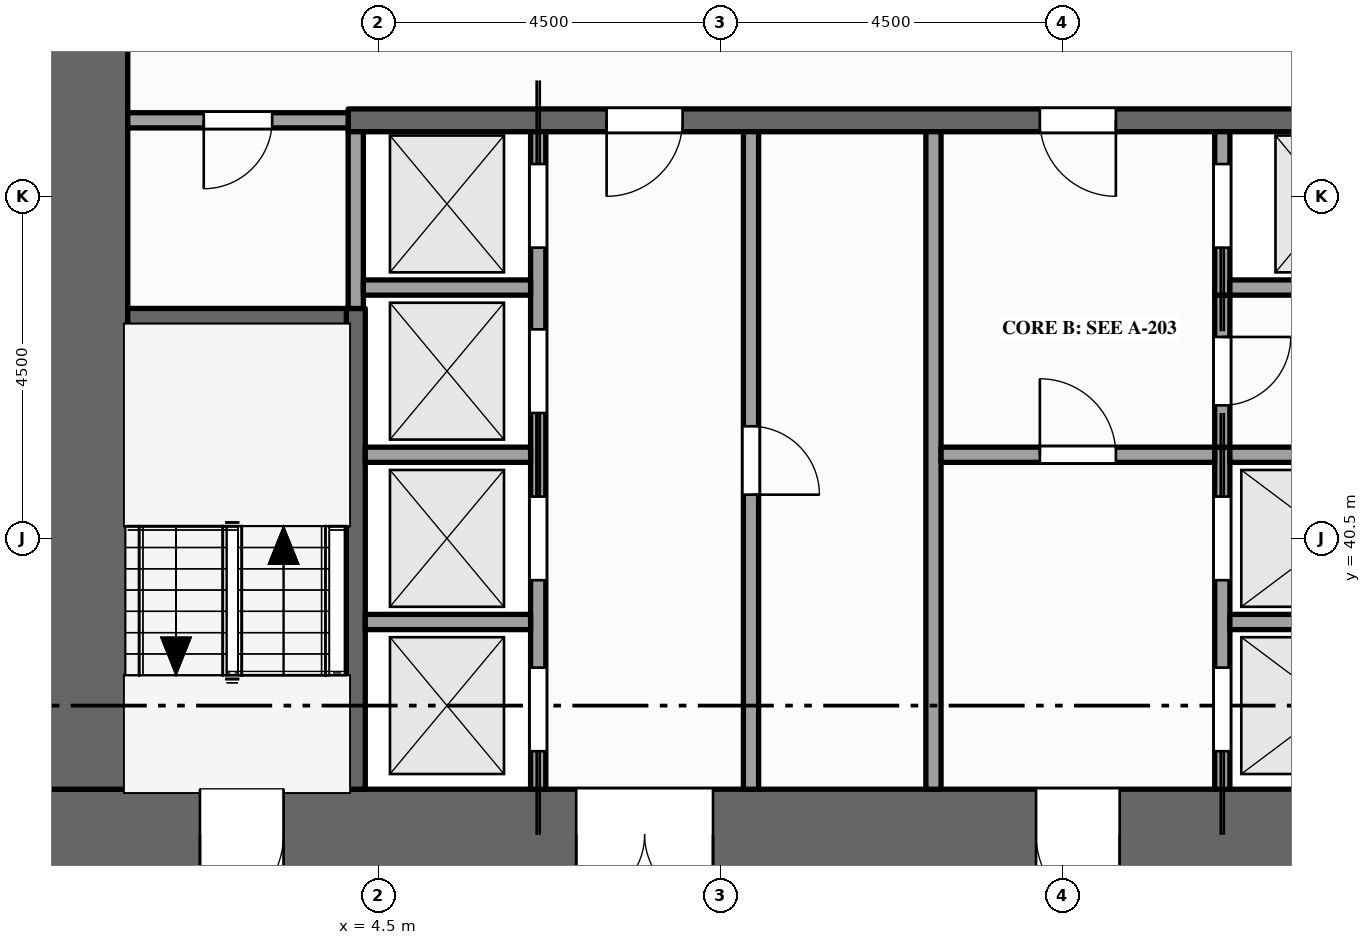
"""IFC4 building model, lengths in metres.
Left out: names, types, materials, properties, quantities, classifications, styles, units other than length and angle.
Written with IfcOpenShell. Run it as: python <this file> out.ifc"""

import sys

from ifc_helpers import new_model, si_unit, direction, frame, frame_2d, origin, place, context, subcontext, project, spatial, rectangle, extrude, element, fill, save


model = new_model("IFC4")
c1 = context("Model", 3, precision=1e-05, world=origin(), true_north=direction((0.0, 1.0)))
c2 = subcontext(c1, "Body", "Model", "MODEL_VIEW")
j1 = project(units=[si_unit("LENGTHUNIT", "METRE"), si_unit("PLANEANGLEUNIT", "RADIAN")], contexts=[c1])
p1 = place(None, origin())
s1 = spatial("IfcSite", under=j1, at=p1, CompositionType="ELEMENT")
p2 = place(p1, origin())
s2 = spatial("IfcBuilding", under=s1, at=p2, CompositionType="ELEMENT")
p3 = place(p2, frame((0.0, 0.0, 14.0)))
s3 = spatial("IfcBuildingStorey", under=s2, at=p3, CompositionType="ELEMENT", Elevation=14.0)
p4 = place(p3, frame((0.0, 36.6, -0.15), z_axis=(0.0, 0.0, 1.0), x_axis=(1.0, 0.0, 0.0)))
e1 = element("IfcWall", 1, at=p4, inside=s3, PredefinedType="SHEAR", context=c2, shape_type="SweptSolid", body=[
    extrude(rectangle(XDim=22.5, YDim=1.2, at=frame_2d((11.25, 0.0))), origin(), (0.0, 0.0, 1.0), 5.0),
])
p5 = place(p4, frame((7.1, 0.0, 0.15)))
e2 = element("IfcOpeningElement", 2, at=p5, cuts=e1, PredefinedType="OPENING", context=c2, shape_type="SweptSolid", body=[
    extrude(rectangle(XDim=1.8, YDim=2.1, at=frame_2d((0.9, 1.05))), frame((0.0, 0.61, 0.0), z_axis=(0.0, -1.0, 0.0), x_axis=(1.0, 0.0, 0.0)), (0.0, 0.0, 1.0), 1.22),
])
p6 = place(p4, frame((13.15, 0.0, 0.15)))
e3 = element("IfcOpeningElement", 3, at=p6, cuts=e1, PredefinedType="OPENING", context=c2, shape_type="SweptSolid", body=[
    extrude(rectangle(XDim=1.1, YDim=2.1, at=frame_2d((0.55, 1.05))), frame((0.0, 0.61, 0.0), z_axis=(0.0, -1.0, 0.0), x_axis=(1.0, 0.0, 0.0)), (0.0, 0.0, 1.0), 1.22),
])
p7 = place(p4, frame((2.15, 0.0, 0.15)))
e4 = element("IfcOpeningElement", 4, at=p7, cuts=e1, PredefinedType="OPENING", context=c2, shape_type="SweptSolid", body=[
    extrude(rectangle(XDim=1.1, YDim=2.1, at=frame_2d((0.55, 1.05))), frame((0.0, 0.61, 0.0), z_axis=(0.0, -1.0, 0.0), x_axis=(1.0, 0.0, 0.0)), (0.0, 0.0, 1.0), 1.22),
])
p8 = place(p4, frame((19.35, 0.0, 0.15)))
e5 = element("IfcOpeningElement", 5, at=p8, cuts=e1, PredefinedType="OPENING", context=c2, shape_type="SweptSolid", body=[
    extrude(rectangle(XDim=1.1, YDim=2.1, at=frame_2d((0.55, 1.05))), frame((0.0, 0.61, 0.0), z_axis=(0.0, -1.0, 0.0), x_axis=(1.0, 0.0, 0.0)), (0.0, 0.0, 1.0), 1.22),
])
p9 = place(p3, frame((0.6, 37.2, -0.15), z_axis=(0.0, 0.0, 1.0), x_axis=(0.0, 1.0, 0.0)))
e6 = element("IfcWall", 6, at=p9, inside=s3, PredefinedType="SHEAR", context=c2, shape_type="SweptSolid", body=[
    extrude(rectangle(XDim=11.1, YDim=1.2, at=frame_2d((5.55, 0.0))), origin(), (0.0, 0.0, 1.0), 5.0),
])
p10 = place(p3, frame((4.2, 37.2, 0.0), z_axis=(0.0, 0.0, 1.0), x_axis=(0.0, 1.0, 0.0)))
e7 = element("IfcWall", 7, at=p10, inside=s3, PredefinedType="SHEAR", context=c2, shape_type="SweptSolid", body=[
    extrude(rectangle(XDim=6.325, YDim=0.25, at=frame_2d((3.163, 0.0))), origin(), (0.0, 0.0, 1.0), 4.75),
])
p11 = place(p3, frame((4.2, 43.525, 0.0), z_axis=(0.0, 0.0, 1.0), x_axis=(0.0, 1.0, 0.0)))
e8 = element("IfcWall", 8, at=p11, inside=s3, PredefinedType="SOLIDWALL", context=c2, shape_type="SweptSolid", body=[
    extrude(rectangle(XDim=2.325, YDim=0.2, at=frame_2d((1.163, 0.0))), origin(), (0.0, 0.0, 1.0), 4.75),
])
p12 = place(p3, frame((6.6, 37.2, 0.0), z_axis=(0.0, 0.0, 1.0), x_axis=(0.0, 1.0, 0.0)))
e9 = element("IfcWall", 9, at=p12, inside=s3, PredefinedType="SOLIDWALL", context=c2, shape_type="SweptSolid", body=[
    extrude(rectangle(XDim=8.65, YDim=0.2, at=frame_2d((4.325, 0.0))), origin(), (0.0, 0.0, 1.0), 4.75),
])
p13 = place(p12, frame((0.5, 0.0, 0.012)))
e10 = element("IfcOpeningElement", 10, at=p13, cuts=e9, PredefinedType="OPENING", context=c2, shape_type="SweptSolid", body=[
    extrude(rectangle(XDim=1.1, YDim=2.1, at=frame_2d((0.55, 1.05))), frame((0.0, 0.11, 0.0), z_axis=(0.0, -1.0, 0.0), x_axis=(1.0, 0.0, 0.0)), (0.0, 0.0, 1.0), 0.22),
])
p14 = place(p12, frame((2.75, 0.0, 0.012)))
e11 = element("IfcOpeningElement", 11, at=p14, cuts=e9, PredefinedType="OPENING", context=c2, shape_type="SweptSolid", body=[
    extrude(rectangle(XDim=1.1, YDim=2.1, at=frame_2d((0.55, 1.05))), frame((0.0, 0.11, 0.0), z_axis=(0.0, -1.0, 0.0), x_axis=(1.0, 0.0, 0.0)), (0.0, 0.0, 1.0), 0.22),
])
p15 = place(p12, frame((4.95, 0.0, 0.012)))
e12 = element("IfcOpeningElement", 12, at=p15, cuts=e9, PredefinedType="OPENING", context=c2, shape_type="SweptSolid", body=[
    extrude(rectangle(XDim=1.1, YDim=2.1, at=frame_2d((0.55, 1.05))), frame((0.0, 0.11, 0.0), z_axis=(0.0, -1.0, 0.0), x_axis=(1.0, 0.0, 0.0)), (0.0, 0.0, 1.0), 0.22),
])
p16 = place(p12, frame((7.125, 0.0, 0.012)))
e13 = element("IfcOpeningElement", 13, at=p16, cuts=e9, PredefinedType="OPENING", context=c2, shape_type="SweptSolid", body=[
    extrude(rectangle(XDim=1.1, YDim=2.1, at=frame_2d((0.55, 1.05))), frame((0.0, 0.11, 0.0), z_axis=(0.0, -1.0, 0.0), x_axis=(1.0, 0.0, 0.0)), (0.0, 0.0, 1.0), 0.22),
])
p17 = place(p3, frame((9.4, 37.2, 0.0), z_axis=(0.0, 0.0, 1.0), x_axis=(0.0, 1.0, 0.0)))
e14 = element("IfcWall", 14, at=p17, inside=s3, PredefinedType="PARTITIONING", context=c2, shape_type="SweptSolid", body=[
    extrude(rectangle(XDim=8.65, YDim=0.2, at=frame_2d((4.325, 0.0))), origin(), (0.0, 0.0, 1.0), 4.75),
])
p18 = place(p17, frame((3.875, 0.0, 0.0)))
e15 = element("IfcOpeningElement", 15, at=p18, cuts=e14, PredefinedType="OPENING", context=c2, shape_type="SweptSolid", body=[
    extrude(rectangle(XDim=0.9, YDim=2.1, at=frame_2d((0.45, 1.05))), frame((0.0, 0.11, 0.0), z_axis=(0.0, -1.0, 0.0), x_axis=(1.0, 0.0, 0.0)), (0.0, 0.0, 1.0), 0.22),
])
p19 = place(p3, frame((11.8, 37.2, 0.0), z_axis=(0.0, 0.0, 1.0), x_axis=(0.0, 1.0, 0.0)))
e16 = element("IfcWall", 16, at=p19, inside=s3, PredefinedType="PARTITIONING", context=c2, shape_type="SweptSolid", body=[
    extrude(rectangle(XDim=8.65, YDim=0.2, at=frame_2d((4.325, 0.0))), origin(), (0.0, 0.0, 1.0), 4.75),
])
p20 = place(p3, frame((15.6, 37.2, 0.0), z_axis=(0.0, 0.0, 1.0), x_axis=(0.0, 1.0, 0.0)))
e17 = element("IfcWall", 17, at=p20, inside=s3, PredefinedType="SOLIDWALL", context=c2, shape_type="SweptSolid", body=[
    extrude(rectangle(XDim=4.5, YDim=0.2, at=frame_2d((2.25, 0.0))), origin(), (0.0, 0.0, 1.0), 4.75),
])
p21 = place(p20, frame((0.5, 0.0, 0.012)))
e18 = element("IfcOpeningElement", 18, at=p21, cuts=e17, PredefinedType="OPENING", context=c2, shape_type="SweptSolid", body=[
    extrude(rectangle(XDim=1.1, YDim=2.1, at=frame_2d((0.55, 1.05))), frame((0.0, 0.11, 0.0), z_axis=(0.0, -1.0, 0.0), x_axis=(1.0, 0.0, 0.0)), (0.0, 0.0, 1.0), 0.22),
])
p22 = place(p20, frame((2.75, 0.0, 0.012)))
e19 = element("IfcOpeningElement", 19, at=p22, cuts=e17, PredefinedType="OPENING", context=c2, shape_type="SweptSolid", body=[
    extrude(rectangle(XDim=1.1, YDim=2.1, at=frame_2d((0.55, 1.05))), frame((0.0, 0.11, 0.0), z_axis=(0.0, -1.0, 0.0), x_axis=(1.0, 0.0, 0.0)), (0.0, 0.0, 1.0), 0.22),
])
p23 = place(p3, frame((15.6, 41.7, 0.0), z_axis=(0.0, 0.0, 1.0), x_axis=(0.0, 1.0, 0.0)))
e20 = element("IfcWall", 20, at=p23, inside=s3, PredefinedType="PARTITIONING", context=c2, shape_type="SweptSolid", body=[
    extrude(rectangle(XDim=2.0, YDim=0.2, at=frame_2d((1.0, 0.0))), origin(), (0.0, 0.0, 1.0), 4.75),
])
p24 = place(p23, frame((0.55, 0.0, 0.0)))
e21 = element("IfcOpeningElement", 21, at=p24, cuts=e20, PredefinedType="OPENING", context=c2, shape_type="SweptSolid", body=[
    extrude(rectangle(XDim=0.9, YDim=2.1, at=frame_2d((0.45, 1.05))), frame((0.0, 0.11, 0.0), z_axis=(0.0, -1.0, 0.0), x_axis=(1.0, 0.0, 0.0)), (0.0, 0.0, 1.0), 0.22),
])
p25 = place(p3, frame((15.6, 43.7, 0.0), z_axis=(0.0, 0.0, 1.0), x_axis=(0.0, 1.0, 0.0)))
e22 = element("IfcWall", 22, at=p25, inside=s3, PredefinedType="SOLIDWALL", context=c2, shape_type="SweptSolid", body=[
    extrude(rectangle(XDim=2.15, YDim=0.2, at=frame_2d((1.075, 0.0))), origin(), (0.0, 0.0, 1.0), 4.75),
])
p26 = place(p25, frame((0.625, 0.0, 0.012)))
e23 = element("IfcOpeningElement", 23, at=p26, cuts=e22, PredefinedType="OPENING", context=c2, shape_type="SweptSolid", body=[
    extrude(rectangle(XDim=1.1, YDim=2.1, at=frame_2d((0.55, 1.05))), frame((0.0, 0.11, 0.0), z_axis=(0.0, -1.0, 0.0), x_axis=(1.0, 0.0, 0.0)), (0.0, 0.0, 1.0), 0.22),
])
p27 = place(p3, frame((4.325, 39.4, 0.0), z_axis=(0.0, 0.0, 1.0), x_axis=(1.0, 0.0, 0.0)))
e24 = element("IfcWall", 24, at=p27, inside=s3, PredefinedType="SOLIDWALL", context=c2, shape_type="SweptSolid", body=[
    extrude(rectangle(XDim=2.175, YDim=0.2, at=frame_2d((1.087, 0.0))), origin(), (0.0, 0.0, 1.0), 4.75),
])
p28 = place(p3, frame((15.7, 39.4, 0.0), z_axis=(0.0, 0.0, 1.0), x_axis=(1.0, 0.0, 0.0)))
e25 = element("IfcWall", 25, at=p28, inside=s3, PredefinedType="SOLIDWALL", context=c2, shape_type="SweptSolid", body=[
    extrude(rectangle(XDim=2.675, YDim=0.2, at=frame_2d((1.337, 0.0))), origin(), (0.0, 0.0, 1.0), 4.75),
])
p29 = place(p3, frame((4.325, 41.6, 0.0), z_axis=(0.0, 0.0, 1.0), x_axis=(1.0, 0.0, 0.0)))
e26 = element("IfcWall", 26, at=p29, inside=s3, PredefinedType="SOLIDWALL", context=c2, shape_type="SweptSolid", body=[
    extrude(rectangle(XDim=2.175, YDim=0.2, at=frame_2d((1.087, 0.0))), origin(), (0.0, 0.0, 1.0), 4.75),
])
p30 = place(p3, frame((11.9, 41.6, 0.0), z_axis=(0.0, 0.0, 1.0), x_axis=(1.0, 0.0, 0.0)))
e27 = element("IfcWall", 27, at=p30, inside=s3, PredefinedType="PARTITIONING", context=c2, shape_type="SweptSolid", body=[
    extrude(rectangle(XDim=3.6, YDim=0.2, at=frame_2d((1.8, 0.0))), origin(), (0.0, 0.0, 1.0), 4.75),
])
p31 = place(p30, frame((1.3, 0.0, 0.0)))
e28 = element("IfcOpeningElement", 28, at=p31, cuts=e27, PredefinedType="OPENING", context=c2, shape_type="SweptSolid", body=[
    extrude(rectangle(XDim=1.0, YDim=2.1, at=frame_2d((0.5, 1.05))), frame((0.0, 0.11, 0.0), z_axis=(0.0, -1.0, 0.0), x_axis=(1.0, 0.0, 0.0)), (0.0, 0.0, 1.0), 0.22),
])
p32 = place(p3, frame((15.7, 41.6, 0.0), z_axis=(0.0, 0.0, 1.0), x_axis=(1.0, 0.0, 0.0)))
e29 = element("IfcWall", 29, at=p32, inside=s3, PredefinedType="SOLIDWALL", context=c2, shape_type="SweptSolid", body=[
    extrude(rectangle(XDim=2.675, YDim=0.2, at=frame_2d((1.337, 0.0))), origin(), (0.0, 0.0, 1.0), 4.75),
])
p33 = place(p3, frame((1.2, 43.4, 0.0), z_axis=(0.0, 0.0, 1.0), x_axis=(1.0, 0.0, 0.0)))
e30 = element("IfcWall", 30, at=p33, inside=s3, PredefinedType="SHEAR", context=c2, shape_type="SweptSolid", body=[
    extrude(rectangle(XDim=2.875, YDim=0.25, at=frame_2d((1.438, 0.0))), origin(), (0.0, 0.0, 1.0), 4.75),
])
p34 = place(p3, frame((4.3, 43.8, 0.0), z_axis=(0.0, 0.0, 1.0), x_axis=(1.0, 0.0, 0.0)))
e31 = element("IfcWall", 31, at=p34, inside=s3, PredefinedType="SOLIDWALL", context=c2, shape_type="SweptSolid", body=[
    extrude(rectangle(XDim=2.2, YDim=0.2, at=frame_2d((1.1, 0.0))), origin(), (0.0, 0.0, 1.0), 4.75),
])
p35 = place(p3, frame((15.7, 43.8, 0.0), z_axis=(0.0, 0.0, 1.0), x_axis=(1.0, 0.0, 0.0)))
e32 = element("IfcWall", 32, at=p35, inside=s3, PredefinedType="SOLIDWALL", context=c2, shape_type="SweptSolid", body=[
    extrude(rectangle(XDim=2.7, YDim=0.2, at=frame_2d((1.35, 0.0))), origin(), (0.0, 0.0, 1.0), 4.75),
])
p36 = place(p3, frame((1.2, 46.0, 0.0), z_axis=(0.0, 0.0, 1.0), x_axis=(1.0, 0.0, 0.0)))
e33 = element("IfcWall", 33, at=p36, inside=s3, PredefinedType="PARTITIONING", context=c2, shape_type="SweptSolid", body=[
    extrude(rectangle(XDim=2.9, YDim=0.2, at=frame_2d((1.45, 0.0))), origin(), (0.0, 0.0, 1.0), 4.75),
])
p37 = place(p36, frame((1.0, 0.0, 0.0)))
e34 = element("IfcOpeningElement", 34, at=p37, cuts=e33, PredefinedType="OPENING", context=c2, shape_type="SweptSolid", body=[
    extrude(rectangle(XDim=0.9, YDim=2.1, at=frame_2d((0.45, 1.05))), frame((0.0, 0.11, 0.0), z_axis=(0.0, -1.0, 0.0), x_axis=(1.0, 0.0, 0.0)), (0.0, 0.0, 1.0), 0.22),
])
p38 = place(p3, frame((4.1, 46.0, 0.0), z_axis=(0.0, 0.0, 1.0), x_axis=(1.0, 0.0, 0.0)))
e35 = element("IfcWall", 35, at=p38, inside=s3, PredefinedType="SHEAR", context=c2, shape_type="SweptSolid", body=[
    extrude(rectangle(XDim=14.5, YDim=0.3, at=frame_2d((7.25, 0.0))), origin(), (0.0, 0.0, 1.0), 4.75),
])
p39 = place(p38, frame((3.4, 0.0, 0.0)))
e36 = element("IfcOpeningElement", 36, at=p39, cuts=e35, PredefinedType="OPENING", context=c2, shape_type="SweptSolid", body=[
    extrude(rectangle(XDim=1.0, YDim=2.1, at=frame_2d((0.5, 1.05))), frame((0.0, 0.16, 0.0), z_axis=(0.0, -1.0, 0.0), x_axis=(1.0, 0.0, 0.0)), (0.0, 0.0, 1.0), 0.32),
])
p40 = place(p38, frame((9.1, 0.0, 0.0)))
e37 = element("IfcOpeningElement", 37, at=p40, cuts=e35, PredefinedType="OPENING", context=c2, shape_type="SweptSolid", body=[
    extrude(rectangle(XDim=1.0, YDim=2.1, at=frame_2d((0.5, 1.05))), frame((0.0, 0.16, 0.0), z_axis=(0.0, -1.0, 0.0), x_axis=(1.0, 0.0, 0.0)), (0.0, 0.0, 1.0), 0.32),
])
p41 = place(p13, origin())
e38 = element("IfcDoor", 38, at=p41, inside=s3, OperationType="SLIDING_TO_LEFT", PredefinedType="DOOR", context=c2, shape_type="SweptSolid", body=[
    extrude(rectangle(XDim=1.1, YDim=2.1, at=frame_2d((0.55, 1.05))), frame((0.0, 0.025, 0.0), z_axis=(0.0, -1.0, 0.0), x_axis=(1.0, 0.0, 0.0)), (0.0, 0.0, 1.0), 0.05),
])
fill(e10, e38)
p42 = place(p14, origin())
e39 = element("IfcDoor", 39, at=p42, inside=s3, OperationType="SLIDING_TO_RIGHT", PredefinedType="DOOR", context=c2, shape_type="SweptSolid", body=[
    extrude(rectangle(XDim=1.1, YDim=2.1, at=frame_2d((0.55, 1.05))), frame((0.0, 0.025, 0.0), z_axis=(0.0, -1.0, 0.0), x_axis=(1.0, 0.0, 0.0)), (0.0, 0.0, 1.0), 0.05),
])
fill(e11, e39)
p43 = place(p15, origin())
e40 = element("IfcDoor", 40, at=p43, inside=s3, OperationType="SLIDING_TO_LEFT", PredefinedType="DOOR", context=c2, shape_type="SweptSolid", body=[
    extrude(rectangle(XDim=1.1, YDim=2.1, at=frame_2d((0.55, 1.05))), frame((0.0, 0.025, 0.0), z_axis=(0.0, -1.0, 0.0), x_axis=(1.0, 0.0, 0.0)), (0.0, 0.0, 1.0), 0.05),
])
fill(e12, e40)
p44 = place(p16, origin())
e41 = element("IfcDoor", 41, at=p44, inside=s3, OperationType="SLIDING_TO_RIGHT", PredefinedType="DOOR", context=c2, shape_type="SweptSolid", body=[
    extrude(rectangle(XDim=1.1, YDim=2.1, at=frame_2d((0.55, 1.05))), frame((0.0, 0.025, 0.0), z_axis=(0.0, -1.0, 0.0), x_axis=(1.0, 0.0, 0.0)), (0.0, 0.0, 1.0), 0.05),
])
fill(e13, e41)
p45 = place(p21, origin())
e42 = element("IfcDoor", 42, at=p45, inside=s3, OperationType="SLIDING_TO_LEFT", PredefinedType="DOOR", context=c2, shape_type="SweptSolid", body=[
    extrude(rectangle(XDim=1.1, YDim=2.1, at=frame_2d((0.55, 1.05))), frame((0.0, 0.025, 0.0), z_axis=(0.0, -1.0, 0.0), x_axis=(1.0, 0.0, 0.0)), (0.0, 0.0, 1.0), 0.05),
])
fill(e18, e42)
p46 = place(p22, origin())
e43 = element("IfcDoor", 43, at=p46, inside=s3, OperationType="SLIDING_TO_RIGHT", PredefinedType="DOOR", context=c2, shape_type="SweptSolid", body=[
    extrude(rectangle(XDim=1.1, YDim=2.1, at=frame_2d((0.55, 1.05))), frame((0.0, 0.025, 0.0), z_axis=(0.0, -1.0, 0.0), x_axis=(1.0, 0.0, 0.0)), (0.0, 0.0, 1.0), 0.05),
])
fill(e19, e43)
p47 = place(p26, origin())
e44 = element("IfcDoor", 44, at=p47, inside=s3, OperationType="SLIDING_TO_LEFT", PredefinedType="DOOR", context=c2, shape_type="SweptSolid", body=[
    extrude(rectangle(XDim=1.1, YDim=2.1, at=frame_2d((0.55, 1.05))), frame((0.0, 0.025, 0.0), z_axis=(0.0, -1.0, 0.0), x_axis=(1.0, 0.0, 0.0)), (0.0, 0.0, 1.0), 0.05),
])
fill(e23, e44)
p48 = place(p5, origin())
e45 = element("IfcDoor", 45, at=p48, inside=s3, OperationType="DOUBLE_DOOR_SINGLE_SWING", PredefinedType="DOOR", context=c2, shape_type="SweptSolid", body=[
    extrude(rectangle(XDim=1.8, YDim=2.1, at=frame_2d((0.9, 1.05))), frame((0.0, 0.025, 0.0), z_axis=(0.0, -1.0, 0.0), x_axis=(1.0, 0.0, 0.0)), (0.0, 0.0, 1.0), 0.05),
])
fill(e2, e45)
p49 = place(p39, origin())
e46 = element("IfcDoor", 46, at=p49, inside=s3, OperationType="SINGLE_SWING_LEFT", PredefinedType="DOOR", context=c2, shape_type="SweptSolid", body=[
    extrude(rectangle(XDim=1.0, YDim=2.1, at=frame_2d((0.5, 1.05))), frame((0.0, 0.025, 0.0), z_axis=(0.0, -1.0, 0.0), x_axis=(1.0, 0.0, 0.0)), (0.0, 0.0, 1.0), 0.05),
])
fill(e36, e46)
p50 = place(p6, origin())
e47 = element("IfcDoor", 47, at=p50, inside=s3, OperationType="SINGLE_SWING_RIGHT", PredefinedType="DOOR", context=c2, shape_type="SweptSolid", body=[
    extrude(rectangle(XDim=1.1, YDim=2.1, at=frame_2d((0.55, 1.05))), frame((0.0, 0.025, 0.0), z_axis=(0.0, -1.0, 0.0), x_axis=(1.0, 0.0, 0.0)), (0.0, 0.0, 1.0), 0.05),
])
fill(e3, e47)
p51 = place(p31, origin())
e48 = element("IfcDoor", 48, at=p51, inside=s3, OperationType="SINGLE_SWING_LEFT", PredefinedType="DOOR", context=c2, shape_type="SweptSolid", body=[
    extrude(rectangle(XDim=1.0, YDim=2.1, at=frame_2d((0.5, 1.05))), frame((0.0, 0.025, 0.0), z_axis=(0.0, -1.0, 0.0), x_axis=(1.0, 0.0, 0.0)), (0.0, 0.0, 1.0), 0.05),
])
fill(e28, e48)
p52 = place(p40, origin())
e49 = element("IfcDoor", 49, at=p52, inside=s3, OperationType="SINGLE_SWING_RIGHT", PredefinedType="DOOR", context=c2, shape_type="SweptSolid", body=[
    extrude(rectangle(XDim=1.0, YDim=2.1, at=frame_2d((0.5, 1.05))), frame((0.0, 0.025, 0.0), z_axis=(0.0, -1.0, 0.0), x_axis=(1.0, 0.0, 0.0)), (0.0, 0.0, 1.0), 0.05),
])
fill(e37, e49)
p53 = place(p7, origin())
e50 = element("IfcDoor", 50, at=p53, inside=s3, OperationType="SINGLE_SWING_LEFT", PredefinedType="DOOR", context=c2, shape_type="SweptSolid", body=[
    extrude(rectangle(XDim=1.1, YDim=2.1, at=frame_2d((0.55, 1.05))), frame((0.0, 0.025, 0.0), z_axis=(0.0, -1.0, 0.0), x_axis=(1.0, 0.0, 0.0)), (0.0, 0.0, 1.0), 0.05),
])
fill(e4, e50)
p54 = place(p37, origin())
e51 = element("IfcDoor", 51, at=p54, inside=s3, OperationType="SINGLE_SWING_LEFT", PredefinedType="DOOR", context=c2, shape_type="SweptSolid", body=[
    extrude(rectangle(XDim=0.9, YDim=2.1, at=frame_2d((0.45, 1.05))), frame((0.0, 0.025, 0.0), z_axis=(0.0, -1.0, 0.0), x_axis=(1.0, 0.0, 0.0)), (0.0, 0.0, 1.0), 0.05),
])
fill(e34, e51)
p55 = place(p18, origin())
e52 = element("IfcDoor", 52, at=p55, inside=s3, OperationType="SINGLE_SWING_LEFT", PredefinedType="DOOR", context=c2, shape_type="SweptSolid", body=[
    extrude(rectangle(XDim=0.9, YDim=2.1, at=frame_2d((0.45, 1.05))), frame((0.0, 0.025, 0.0), z_axis=(0.0, -1.0, 0.0), x_axis=(1.0, 0.0, 0.0)), (0.0, 0.0, 1.0), 0.05),
])
fill(e15, e52)
p56 = place(p24, origin())
e53 = element("IfcDoor", 53, at=p56, inside=s3, OperationType="SINGLE_SWING_RIGHT", PredefinedType="DOOR", context=c2, shape_type="SweptSolid", body=[
    extrude(rectangle(XDim=0.9, YDim=2.1, at=frame_2d((0.45, 1.05))), frame((0.0, 0.025, 0.0), z_axis=(0.0, -1.0, 0.0), x_axis=(1.0, 0.0, 0.0)), (0.0, 0.0, 1.0), 0.05),
])
fill(e21, e53)
save(model, sys.argv[1])
